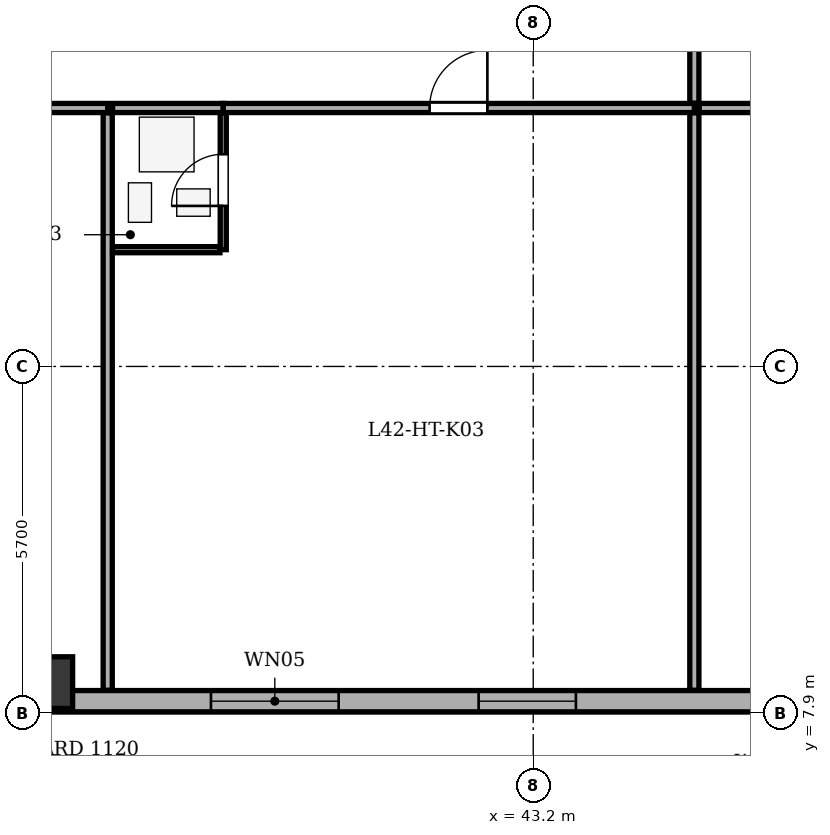
"""IFC4 building model, lengths in metres.
Left out: names, types, materials, properties, quantities, classifications, styles, units other than length and angle.
Written with IfcOpenShell. Run it as: python <this file> out.ifc"""

import sys

from ifc_helpers import new_model, si_unit, direction, frame, frame_2d, origin, origin_2d, place, context, subcontext, project, spatial, rectangle, extrude, element, fill, save


model = new_model("IFC4")
c1 = context("Model", 3, precision=1e-05, world=origin(), true_north=direction((0.0, 1.0)))
c2 = subcontext(c1, "Body", "Model", "MODEL_VIEW")
j1 = project(units=[si_unit("LENGTHUNIT", "METRE"), si_unit("PLANEANGLEUNIT", "RADIAN")], contexts=[c1])
p1 = place(None, origin())
s1 = spatial("IfcSite", under=j1, at=p1, CompositionType="ELEMENT")
p2 = place(p1, origin())
s2 = spatial("IfcBuilding", under=s1, at=p2, CompositionType="ELEMENT")
p3 = place(p2, frame((0.0, 0.0, 165.8)))
s3 = spatial("IfcBuildingStorey", under=s2, at=p3, CompositionType="ELEMENT", Elevation=165.8)
p4 = place(p3, frame((35.2, 8.4, 0.0), z_axis=(0.0, 0.0, 1.0), x_axis=(1.0, 0.0, 0.0)))
e1 = element("IfcColumn", 1, at=p4, inside=s3, PredefinedType="COLUMN", context=c2, shape_type="SweptSolid", body=[
    extrude(rectangle(XDim=0.85, YDim=0.85, at=origin_2d()), origin(), (0.0, 0.0, 1.0), 3.5),
])
p5 = place(p3, frame((50.7, 8.095, 0.0), z_axis=(0.0, 0.0, 1.0), x_axis=(-1.0, 0.0, 0.0)))
e2 = element("IfcWall", 2, at=p5, inside=s3, PredefinedType="STANDARD", context=c2, shape_type="SweptSolid", body=[
    extrude(rectangle(XDim=35.0, YDim=0.35, at=frame_2d((17.5, 0.0))), origin(), (0.0, 0.0, 1.0), 2.785),
])
p6 = place(p5, frame((26.0, 0.0, 0.0)))
e3 = element("IfcOpeningElement", 3, at=p6, cuts=e2, PredefinedType="OPENING", context=c2, shape_type="SweptSolid", body=[
    extrude(rectangle(XDim=1.0, YDim=2.02, at=frame_2d((0.5, 1.01))), frame((0.0, 0.185, 0.0), z_axis=(0.0, -1.0, 0.0), x_axis=(1.0, 0.0, 0.0)), (0.0, 0.0, 1.0), 0.37),
])
p7 = place(p5, frame((1.763, 0.0, 0.75)))
e4 = element("IfcOpeningElement", 4, at=p7, cuts=e2, PredefinedType="OPENING", context=c2, shape_type="SweptSolid", body=[
    extrude(rectangle(XDim=1.6, YDim=1.75, at=frame_2d((0.8, 0.875))), frame((0.0, 0.185, 0.0), z_axis=(0.0, -1.0, 0.0), x_axis=(1.0, 0.0, 0.0)), (0.0, 0.0, 1.0), 0.37),
])
p8 = place(p5, frame((6.798, 0.0, 0.75)))
e5 = element("IfcOpeningElement", 5, at=p8, cuts=e2, PredefinedType="OPENING", context=c2, shape_type="SweptSolid", body=[
    extrude(rectangle(XDim=1.6, YDim=1.75, at=frame_2d((0.8, 0.875))), frame((0.0, 0.185, 0.0), z_axis=(0.0, -1.0, 0.0), x_axis=(1.0, 0.0, 0.0)), (0.0, 0.0, 1.0), 0.37),
])
p9 = place(p5, frame((10.7, 0.0, 0.75)))
e6 = element("IfcOpeningElement", 6, at=p9, cuts=e2, PredefinedType="OPENING", context=c2, shape_type="SweptSolid", body=[
    extrude(rectangle(XDim=2.1, YDim=1.75, at=frame_2d((1.05, 0.875))), frame((0.0, 0.185, 0.0), z_axis=(0.0, -1.0, 0.0), x_axis=(1.0, 0.0, 0.0)), (0.0, 0.0, 1.0), 0.37),
])
p10 = place(p5, frame((16.896, 0.0, 0.75)))
e7 = element("IfcOpeningElement", 7, at=p10, cuts=e2, PredefinedType="OPENING", context=c2, shape_type="SweptSolid", body=[
    extrude(rectangle(XDim=1.6, YDim=1.75, at=frame_2d((0.8, 0.875))), frame((0.0, 0.185, 0.0), z_axis=(0.0, -1.0, 0.0), x_axis=(1.0, 0.0, 0.0)), (0.0, 0.0, 1.0), 0.37),
])
p11 = place(p5, frame((19.704, 0.0, 0.75)))
e8 = element("IfcOpeningElement", 8, at=p11, cuts=e2, PredefinedType="OPENING", context=c2, shape_type="SweptSolid", body=[
    extrude(rectangle(XDim=1.6, YDim=1.75, at=frame_2d((0.8, 0.875))), frame((0.0, 0.185, 0.0), z_axis=(0.0, -1.0, 0.0), x_axis=(1.0, 0.0, 0.0)), (0.0, 0.0, 1.0), 0.37),
])
p12 = place(p5, frame((31.6, 0.0, 0.75)))
e9 = element("IfcOpeningElement", 9, at=p12, cuts=e2, PredefinedType="OPENING", context=c2, shape_type="SweptSolid", body=[
    extrude(rectangle(XDim=1.6, YDim=1.75, at=frame_2d((0.8, 0.875))), frame((0.0, 0.185, 0.0), z_axis=(0.0, -1.0, 0.0), x_axis=(1.0, 0.0, 0.0)), (0.0, 0.0, 1.0), 0.37),
])
p13 = place(p3, frame((27.549, 17.85, 0.0), z_axis=(0.0, 0.0, 1.0), x_axis=(1.0, 0.0, 0.0)))
e10 = element("IfcWall", 10, at=p13, inside=s3, PredefinedType="PARTITIONING", context=c2, shape_type="SweptSolid", body=[
    extrude(rectangle(XDim=8.653, YDim=0.15, at=frame_2d((4.326, 0.0))), origin(), (0.0, 0.0, 1.0), 3.2),
])
p14 = place(p13, frame((3.846, 0.0, 0.0)))
e11 = element("IfcOpeningElement", 11, at=p14, cuts=e10, PredefinedType="OPENING", context=c2, shape_type="SweptSolid", body=[
    extrude(rectangle(XDim=0.95, YDim=2.1, at=frame_2d((0.475, 1.05))), frame((0.0, 0.085, 0.0), z_axis=(0.0, -1.0, 0.0), x_axis=(1.0, 0.0, 0.0)), (0.0, 0.0, 1.0), 0.17),
])
p15 = place(p3, frame((36.202, 8.275, 0.0), z_axis=(0.0, 0.0, 1.0), x_axis=(0.0, 1.0, 0.0)))
e12 = element("IfcWall", 12, at=p15, inside=s3, PredefinedType="PARTITIONING", context=c2, shape_type="SweptSolid", body=[
    extrude(rectangle(XDim=9.495, YDim=0.15, at=frame_2d((4.748, 0.0))), origin(), (0.0, 0.0, 1.0), 3.2),
])
p16 = place(p3, frame((36.282, 17.85, 0.0), z_axis=(0.0, 0.0, 1.0), x_axis=(1.0, 0.0, 0.0)))
e13 = element("IfcWall", 13, at=p16, inside=s3, PredefinedType="PARTITIONING", context=c2, shape_type="SweptSolid", body=[
    extrude(rectangle(XDim=1.82, YDim=0.15, at=frame_2d((0.91, 0.0))), origin(), (0.0, 0.0, 1.0), 3.2),
])
p17 = place(p3, frame((38.102, 17.85, 0.0), z_axis=(0.0, 0.0, 1.0), x_axis=(1.0, 0.0, 0.0)))
e14 = element("IfcWall", 14, at=p17, inside=s3, PredefinedType="PARTITIONING", context=c2, shape_type="SweptSolid", body=[
    extrude(rectangle(XDim=7.748, YDim=0.15, at=frame_2d((3.874, 0.0))), origin(), (0.0, 0.0, 1.0), 3.2),
])
p18 = place(p17, frame((3.394, 0.0, 0.0)))
e15 = element("IfcOpeningElement", 15, at=p18, cuts=e14, PredefinedType="OPENING", context=c2, shape_type="SweptSolid", body=[
    extrude(rectangle(XDim=0.95, YDim=2.1, at=frame_2d((0.475, 1.05))), frame((0.0, 0.085, 0.0), z_axis=(0.0, -1.0, 0.0), x_axis=(1.0, 0.0, 0.0)), (0.0, 0.0, 1.0), 0.17),
])
p19 = place(p3, frame((38.102, 15.52, 0.0), z_axis=(0.0, 0.0, 1.0), x_axis=(0.0, 1.0, 0.0)))
e16 = element("IfcWall", 16, at=p19, inside=s3, PredefinedType="PARTITIONING", context=c2, shape_type="SweptSolid", body=[
    extrude(rectangle(XDim=2.25, YDim=0.1, at=frame_2d((1.125, 0.0))), origin(), (0.0, 0.0, 1.0), 3.2),
])
p20 = place(p19, frame((0.72, 0.0, 0.0)))
e17 = element("IfcOpeningElement", 17, at=p20, cuts=e16, PredefinedType="OPENING", context=c2, shape_type="SweptSolid", body=[
    extrude(rectangle(XDim=0.85, YDim=2.05, at=frame_2d((0.425, 1.025))), frame((0.0, 0.06, 0.0), z_axis=(0.0, -1.0, 0.0), x_axis=(1.0, 0.0, 0.0)), (0.0, 0.0, 1.0), 0.12),
])
p21 = place(p3, frame((36.282, 15.52, 0.0), z_axis=(0.0, 0.0, 1.0), x_axis=(1.0, 0.0, 0.0)))
e18 = element("IfcWall", 18, at=p21, inside=s3, PredefinedType="PARTITIONING", context=c2, shape_type="SweptSolid", body=[
    extrude(rectangle(XDim=1.765, YDim=0.1, at=frame_2d((0.883, 0.0))), origin(), (0.0, 0.0, 1.0), 3.2),
])
p22 = place(p3, frame((45.85, 8.275, 0.0), z_axis=(0.0, 0.0, 1.0), x_axis=(0.0, 1.0, 0.0)))
e19 = element("IfcWall", 19, at=p22, inside=s3, PredefinedType="PARTITIONING", context=c2, shape_type="SweptSolid", body=[
    extrude(rectangle(XDim=9.495, YDim=0.15, at=frame_2d((4.748, 0.0))), origin(), (0.0, 0.0, 1.0), 3.2),
])
p23 = place(p3, frame((45.93, 17.85, 0.0), z_axis=(0.0, 0.0, 1.0), x_axis=(1.0, 0.0, 0.0)))
e20 = element("IfcWall", 20, at=p23, inside=s3, PredefinedType="PARTITIONING", context=c2, shape_type="SweptSolid", body=[
    extrude(rectangle(XDim=9.395, YDim=0.15, at=frame_2d((4.698, 0.0))), origin(), (0.0, 0.0, 1.0), 3.2),
])
p24 = place(p3, frame((45.85, 17.93, 0.0), z_axis=(0.0, 0.0, 1.0), x_axis=(0.0, 1.0, 0.0)))
e21 = element("IfcWall", 21, at=p24, inside=s3, PredefinedType="PARTITIONING", context=c2, shape_type="SweptSolid", body=[
    extrude(rectangle(XDim=18.54, YDim=0.15, at=frame_2d((9.27, 0.0))), origin(), (0.0, 0.0, 1.0), 3.2),
])
p25 = place(p24, frame((8.79, 0.0, 0.0)))
e22 = element("IfcOpeningElement", 22, at=p25, cuts=e21, PredefinedType="OPENING", context=c2, shape_type="SweptSolid", body=[
    extrude(rectangle(XDim=0.95, YDim=2.1, at=frame_2d((0.475, 1.05))), frame((0.0, 0.085, 0.0), z_axis=(0.0, -1.0, 0.0), x_axis=(1.0, 0.0, 0.0)), (0.0, 0.0, 1.0), 0.17),
])
p26 = place(p8, origin())
e23 = element("IfcWindow", 23, at=p26, inside=s3, PartitioningType="SINGLE_PANEL", PredefinedType="WINDOW", context=c2, shape_type="SweptSolid", body=[
    extrude(rectangle(XDim=1.6, YDim=1.75, at=frame_2d((0.8, 0.875))), frame((0.0, -0.01, 0.0), z_axis=(0.0, -1.0, 0.0), x_axis=(1.0, 0.0, 0.0)), (0.0, 0.0, 1.0), 0.06),
])
fill(e5, e23)
p27 = place(p9, origin())
e24 = element("IfcWindow", 24, at=p27, inside=s3, PartitioningType="SINGLE_PANEL", PredefinedType="WINDOW", context=c2, shape_type="SweptSolid", body=[
    extrude(rectangle(XDim=2.1, YDim=1.75, at=frame_2d((1.05, 0.875))), frame((0.0, -0.01, 0.0), z_axis=(0.0, -1.0, 0.0), x_axis=(1.0, 0.0, 0.0)), (0.0, 0.0, 1.0), 0.06),
])
fill(e6, e24)
p28 = place(p20, origin())
e25 = element("IfcDoor", 25, at=p28, inside=s3, OperationType="SINGLE_SWING_LEFT", PredefinedType="DOOR", context=c2, shape_type="SweptSolid", body=[
    extrude(rectangle(XDim=0.85, YDim=2.05, at=frame_2d((0.425, 1.025))), frame((0.0, 0.025, 0.0), z_axis=(0.0, -1.0, 0.0), x_axis=(1.0, 0.0, 0.0)), (0.0, 0.0, 1.0), 0.05),
])
fill(e17, e25)
p29 = place(p18, origin())
e26 = element("IfcDoor", 26, at=p29, inside=s3, OperationType="SINGLE_SWING_RIGHT", PredefinedType="DOOR", context=c2, shape_type="SweptSolid", body=[
    extrude(rectangle(XDim=0.95, YDim=2.1, at=frame_2d((0.475, 1.05))), frame((0.0, 0.025, 0.0), z_axis=(0.0, -1.0, 0.0), x_axis=(1.0, 0.0, 0.0)), (0.0, 0.0, 1.0), 0.05),
])
fill(e15, e26)
save(model, sys.argv[1])
